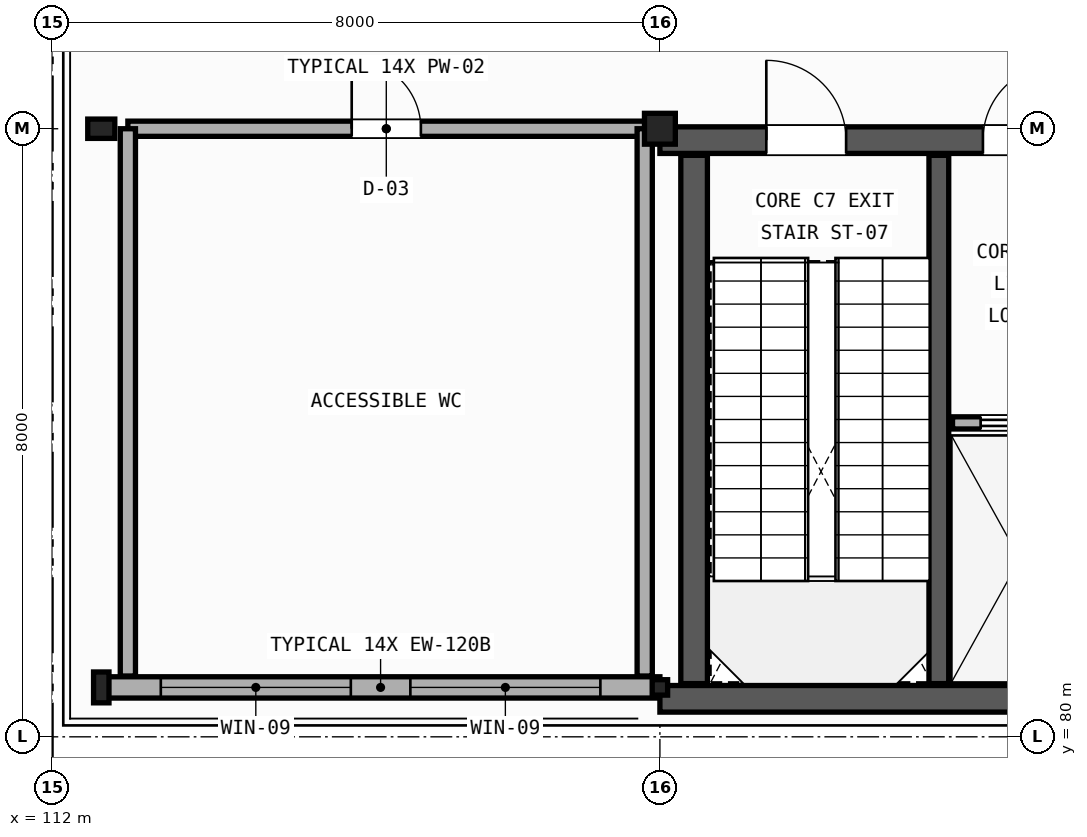
"""IFC4 building model, lengths in metres.
Left out: names, types, materials, properties, quantities, classifications, styles, units other than length and angle.
Written with IfcOpenShell. Run it as: python <this file> out.ifc"""

import sys

from ifc_helpers import new_model, si_unit, direction, frame, frame_2d, origin, origin_2d, place, context, subcontext, project, spatial, rectangle, hollow_rectangle, hollow_circle, extrude, element, fill, save


model = new_model("IFC4")
c1 = context("Model", 3, precision=1e-05, world=origin(), true_north=direction((0.0, 1.0)))
c2 = subcontext(c1, "Body", "Model", "MODEL_VIEW")
j1 = project(units=[si_unit("LENGTHUNIT", "METRE"), si_unit("PLANEANGLEUNIT", "RADIAN")], contexts=[c1])
p1 = place(None, origin())
s1 = spatial("IfcSite", under=j1, at=p1, CompositionType="ELEMENT")
p2 = place(p1, origin())
s2 = spatial("IfcBuilding", under=s1, at=p2, CompositionType="ELEMENT")
p3 = place(p2, frame((0.0, 0.0, 15.0)))
s3 = spatial("IfcBuildingStorey", under=s2, at=p3, CompositionType="ELEMENT", Elevation=15.0)
p4 = place(p3, frame((112.65, 80.65, 0.0), z_axis=(0.0, 0.0, 1.0), x_axis=(1.0, 0.0, 0.0)))
e1 = element("IfcColumn", 1, at=p4, inside=s3, PredefinedType="COLUMN", context=c2, shape_type="SweptSolid", body=[
    extrude(hollow_rectangle(XDim=0.203, YDim=0.406, WallThickness=0.012, InnerFilletRadius=0.012, OuterFilletRadius=0.024, at=origin_2d()), origin(), (0.0, 0.0, 1.0), 4.58),
])
p5 = place(p3, frame((112.65, 88.0, 0.0), z_axis=(0.0, 0.0, 1.0), x_axis=(0.0, 1.0, 0.0)))
e2 = element("IfcColumn", 2, at=p5, inside=s3, PredefinedType="COLUMN", context=c2, shape_type="SweptSolid", body=[
    extrude(hollow_rectangle(XDim=0.254, YDim=0.356, WallThickness=0.012, InnerFilletRadius=0.012, OuterFilletRadius=0.024, at=origin_2d()), origin(), (0.0, 0.0, 1.0), 4.58),
])
p6 = place(p3, frame((120.0, 80.65, 0.0), z_axis=(0.0, 0.0, 1.0), x_axis=(0.0, 1.0, 0.0)))
e3 = element("IfcColumn", 3, at=p6, inside=s3, PredefinedType="COLUMN", context=c2, shape_type="SweptSolid", body=[
    extrude(hollow_rectangle(XDim=0.203, YDim=0.203, WallThickness=0.009, InnerFilletRadius=0.009, OuterFilletRadius=0.018, at=origin_2d()), origin(), (0.0, 0.0, 1.0), 4.58),
])
p7 = place(p3, frame((120.0, 88.0, 0.0), z_axis=(0.0, 0.0, 1.0), x_axis=(1.0, 0.0, 0.0)))
e4 = element("IfcColumn", 4, at=p7, inside=s3, PredefinedType="COLUMN", context=c2, shape_type="SweptSolid", body=[
    extrude(hollow_circle(Radius=0.203, WallThickness=0.012, at=origin_2d()), origin(), (0.0, 0.0, 1.0), 4.58),
])
p8 = place(p3, frame((112.65, 80.65, 0.0), z_axis=(0.0, 0.0, 1.0), x_axis=(1.0, 0.0, 0.0)))
e5 = element("IfcWall", 5, at=p8, inside=s3, PredefinedType="STANDARD", context=c2, shape_type="SweptSolid", body=[
    extrude(rectangle(XDim=7.35, YDim=0.28, at=frame_2d((3.675, 0.0))), origin(), (0.0, 0.0, 1.0), 4.007),
])
p9 = place(p8, frame((0.783, 0.0, 1.0)))
e6 = element("IfcOpeningElement", 6, at=p9, cuts=e5, PredefinedType="OPENING", context=c2, shape_type="SweptSolid", body=[
    extrude(rectangle(XDim=2.5, YDim=2.1, at=frame_2d((1.25, 1.05))), frame((0.0, 0.15, 0.0), z_axis=(0.0, -1.0, 0.0), x_axis=(1.0, 0.0, 0.0)), (0.0, 0.0, 1.0), 0.3),
])
p10 = place(p8, frame((4.067, 0.0, 1.0)))
e7 = element("IfcOpeningElement", 7, at=p10, cuts=e5, PredefinedType="OPENING", context=c2, shape_type="SweptSolid", body=[
    extrude(rectangle(XDim=2.5, YDim=2.1, at=frame_2d((1.25, 1.05))), frame((0.0, 0.15, 0.0), z_axis=(0.0, -1.0, 0.0), x_axis=(1.0, 0.0, 0.0)), (0.0, 0.0, 1.0), 0.3),
])
p11 = place(p3, frame((120.0, 87.85, 0.0), z_axis=(0.0, 0.0, 1.0), x_axis=(1.0, 0.0, 0.0)))
e8 = element("IfcWall", 8, at=p11, inside=s3, PredefinedType="SHEAR", context=c2, shape_type="SweptSolid", body=[
    extrude(rectangle(XDim=5.85, YDim=0.35, at=frame_2d((2.925, 0.0))), origin(), (0.0, 0.0, 1.0), 4.57),
])
p12 = place(p11, frame((1.4, 0.0, 0.0)))
e9 = element("IfcOpeningElement", 9, at=p12, cuts=e8, PredefinedType="OPENING", context=c2, shape_type="SweptSolid", body=[
    extrude(rectangle(XDim=1.05, YDim=2.1, at=frame_2d((0.525, 1.05))), frame((0.0, 0.185, 0.0), z_axis=(0.0, -1.0, 0.0), x_axis=(1.0, 0.0, 0.0)), (0.0, 0.0, 1.0), 0.37),
])
p13 = place(p11, frame((4.25, 0.0, 0.0)))
e10 = element("IfcOpeningElement", 10, at=p13, cuts=e8, PredefinedType="OPENING", context=c2, shape_type="SweptSolid", body=[
    extrude(rectangle(XDim=1.0, YDim=2.15, at=frame_2d((0.5, 1.075))), frame((0.0, 0.185, 0.0), z_axis=(0.0, -1.0, 0.0), x_axis=(1.0, 0.0, 0.0)), (0.0, 0.0, 1.0), 0.37),
])
p14 = place(p3, frame((120.0, 80.5, 0.0), z_axis=(0.0, 0.0, 1.0), x_axis=(1.0, 0.0, 0.0)))
e11 = element("IfcWall", 11, at=p14, inside=s3, PredefinedType="SHEAR", context=c2, shape_type="SweptSolid", body=[
    extrude(rectangle(XDim=5.85, YDim=0.35, at=frame_2d((2.925, 0.0))), origin(), (0.0, 0.0, 1.0), 4.57),
])
p15 = place(p3, frame((120.45, 80.7, 0.0), z_axis=(0.0, 0.0, 1.0), x_axis=(0.0, 1.0, 0.0)))
e12 = element("IfcWall", 12, at=p15, inside=s3, PredefinedType="SHEAR", context=c2, shape_type="SweptSolid", body=[
    extrude(rectangle(XDim=6.95, YDim=0.35, at=frame_2d((3.475, 0.0))), origin(), (0.0, 0.0, 1.0), 4.57),
])
p16 = place(p3, frame((123.67, 80.7, 0.0), z_axis=(0.0, 0.0, 1.0), x_axis=(0.0, 1.0, 0.0)))
e13 = element("IfcWall", 13, at=p16, inside=s3, PredefinedType="SHEAR", context=c2, shape_type="SweptSolid", body=[
    extrude(rectangle(XDim=6.95, YDim=0.26, at=frame_2d((3.475, 0.0))), origin(), (0.0, 0.0, 1.0), 4.57),
])
p17 = place(p3, frame((123.85, 84.13, 0.0), z_axis=(0.0, 0.0, 1.0), x_axis=(1.0, 0.0, 0.0)))
e14 = element("IfcWall", 14, at=p17, inside=s3, PredefinedType="PARTITIONING", context=c2, shape_type="SweptSolid", body=[
    extrude(rectangle(XDim=1.84, YDim=0.16, at=frame_2d((0.92, 0.0))), origin(), (0.0, 0.0, 1.0), 3.6),
])
p18 = place(p17, frame((0.37, 0.0, 0.0)))
e15 = element("IfcOpeningElement", 15, at=p18, cuts=e14, PredefinedType="OPENING", context=c2, shape_type="SweptSolid", body=[
    extrude(rectangle(XDim=1.1, YDim=2.15, at=frame_2d((0.55, 1.075))), frame((0.0, 0.09, 0.0), z_axis=(0.0, -1.0, 0.0), x_axis=(1.0, 0.0, 0.0)), (0.0, 0.0, 1.0), 0.18),
])
p19 = place(p3, frame((113.0, 88.0, 0.0), z_axis=(0.0, 0.0, 1.0), x_axis=(1.0, 0.0, 0.0)))
e16 = element("IfcWall", 16, at=p19, inside=s3, PredefinedType="PLUMBINGWALL", context=c2, shape_type="SweptSolid", body=[
    extrude(rectangle(XDim=6.8, YDim=0.2, at=frame_2d((3.4, 0.0))), origin(), (0.0, 0.0, 1.0), 3.932),
])
p20 = place(p19, frame((2.945, 0.0, 0.0)))
e17 = element("IfcOpeningElement", 17, at=p20, cuts=e16, PredefinedType="OPENING", context=c2, shape_type="SweptSolid", body=[
    extrude(rectangle(XDim=0.91, YDim=2.1, at=frame_2d((0.455, 1.05))), frame((0.0, 0.11, 0.0), z_axis=(0.0, -1.0, 0.0), x_axis=(1.0, 0.0, 0.0)), (0.0, 0.0, 1.0), 0.22),
])
p21 = place(p3, frame((113.0, 80.8, 0.0), z_axis=(0.0, 0.0, 1.0), x_axis=(0.0, 1.0, 0.0)))
e18 = element("IfcWall", 18, at=p21, inside=s3, PredefinedType="PLUMBINGWALL", context=c2, shape_type="SweptSolid", body=[
    extrude(rectangle(XDim=7.2, YDim=0.2, at=frame_2d((3.6, 0.0))), origin(), (0.0, 0.0, 1.0), 4.29),
])
p22 = place(p3, frame((119.8, 80.8, 0.0), z_axis=(0.0, 0.0, 1.0), x_axis=(0.0, 1.0, 0.0)))
e19 = element("IfcWall", 19, at=p22, inside=s3, PredefinedType="PLUMBINGWALL", context=c2, shape_type="SweptSolid", body=[
    extrude(rectangle(XDim=7.2, YDim=0.2, at=frame_2d((3.6, 0.0))), origin(), (0.0, 0.0, 1.0), 4.007),
])
p23 = place(p9, origin())
e20 = element("IfcWindow", 20, at=p23, inside=s3, PartitioningType="SINGLE_PANEL", PredefinedType="WINDOW", context=c2, shape_type="SweptSolid", body=[
    extrude(rectangle(XDim=2.5, YDim=2.1, at=frame_2d((1.25, 1.05))), frame((0.0, 0.03, 0.0), z_axis=(0.0, -1.0, 0.0), x_axis=(1.0, 0.0, 0.0)), (0.0, 0.0, 1.0), 0.06),
])
fill(e6, e20)
p24 = place(p10, origin())
e21 = element("IfcWindow", 21, at=p24, inside=s3, PartitioningType="SINGLE_PANEL", PredefinedType="WINDOW", context=c2, shape_type="SweptSolid", body=[
    extrude(rectangle(XDim=2.5, YDim=2.1, at=frame_2d((1.25, 1.05))), frame((0.0, 0.03, 0.0), z_axis=(0.0, -1.0, 0.0), x_axis=(1.0, 0.0, 0.0)), (0.0, 0.0, 1.0), 0.06),
])
fill(e7, e21)
p25 = place(p18, origin())
e22 = element("IfcDoor", 22, at=p25, inside=s3, OperationType="SLIDING_TO_LEFT", PredefinedType="DOOR", context=c2, shape_type="SweptSolid", body=[
    extrude(rectangle(XDim=1.1, YDim=2.15, at=frame_2d((0.55, 1.075))), frame((0.0, 0.025, 0.0), z_axis=(0.0, -1.0, 0.0), x_axis=(1.0, 0.0, 0.0)), (0.0, 0.0, 1.0), 0.05),
])
fill(e15, e22)
p26 = place(p12, origin())
e23 = element("IfcDoor", 23, at=p26, inside=s3, OperationType="SINGLE_SWING_LEFT", PredefinedType="DOOR", context=c2, shape_type="SweptSolid", body=[
    extrude(rectangle(XDim=1.05, YDim=2.1, at=frame_2d((0.525, 1.05))), frame((0.0, 0.025, 0.0), z_axis=(0.0, -1.0, 0.0), x_axis=(1.0, 0.0, 0.0)), (0.0, 0.0, 1.0), 0.05),
])
fill(e9, e23)
p27 = place(p13, origin())
e24 = element("IfcDoor", 24, at=p27, inside=s3, OperationType="SINGLE_SWING_RIGHT", PredefinedType="DOOR", context=c2, shape_type="SweptSolid", body=[
    extrude(rectangle(XDim=1.0, YDim=2.15, at=frame_2d((0.5, 1.075))), frame((0.0, 0.025, 0.0), z_axis=(0.0, -1.0, 0.0), x_axis=(1.0, 0.0, 0.0)), (0.0, 0.0, 1.0), 0.05),
])
fill(e10, e24)
p28 = place(p20, origin())
e25 = element("IfcDoor", 25, at=p28, inside=s3, OperationType="SINGLE_SWING_LEFT", PredefinedType="DOOR", context=c2, shape_type="SweptSolid", body=[
    extrude(rectangle(XDim=0.91, YDim=2.1, at=frame_2d((0.455, 1.05))), frame((0.0, 0.025, 0.0), z_axis=(0.0, -1.0, 0.0), x_axis=(1.0, 0.0, 0.0)), (0.0, 0.0, 1.0), 0.05),
])
fill(e17, e25)
save(model, sys.argv[1])
